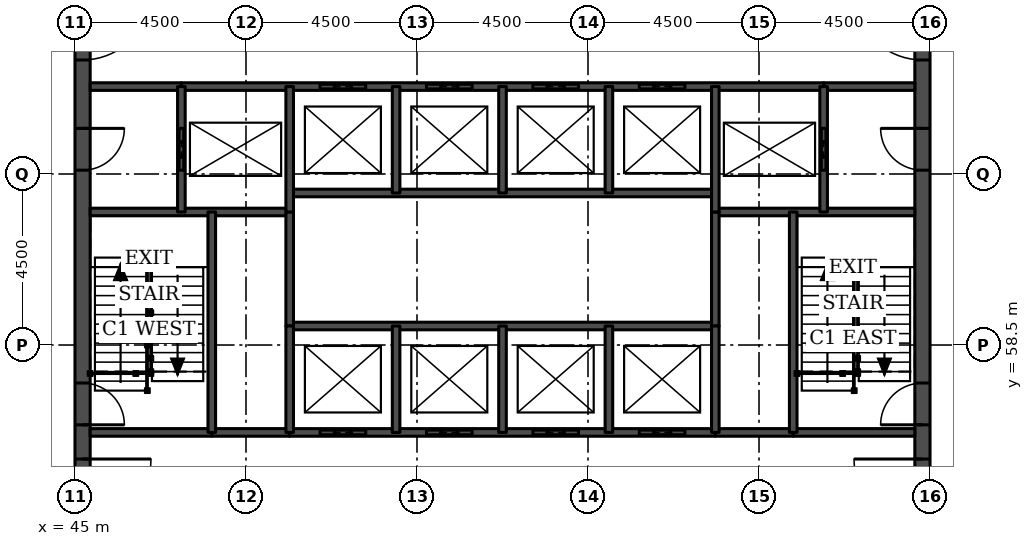
"""IFC4 building model, lengths in metres.
Left out: names, types, materials, properties, quantities, classifications, styles, units other than length and angle.
Written with IfcOpenShell. Run it as: python <this file> out.ifc"""

import sys

from ifc_helpers import new_model, si_unit, direction, frame, frame_2d, origin, place, context, subcontext, project, spatial, rectangle, extrude, element, fill, save


model = new_model("IFC4")
c1 = context("Model", 3, precision=1e-05, world=origin(), true_north=direction((0.0, 1.0)))
c2 = subcontext(c1, "Body", "Model", "MODEL_VIEW")
j1 = project(units=[si_unit("LENGTHUNIT", "METRE"), si_unit("PLANEANGLEUNIT", "RADIAN")], contexts=[c1])
p1 = place(None, origin())
s1 = spatial("IfcSite", under=j1, at=p1, CompositionType="ELEMENT")
p2 = place(p1, origin())
s2 = spatial("IfcBuilding", under=s1, at=p2, CompositionType="ELEMENT")
p3 = place(p2, frame((0.0, 0.0, 211.9)))
s3 = spatial("IfcBuildingStorey", under=s2, at=p3, CompositionType="ELEMENT", Elevation=211.9)
p4 = place(p3, frame((45.2, 49.5, 0.0), z_axis=(0.0, 0.0, 1.0), x_axis=(0.0, 1.0, 0.0)))
e1 = element("IfcWall", 1, at=p4, inside=s3, PredefinedType="SHEAR", context=c2, shape_type="SweptSolid", body=[
    extrude(rectangle(XDim=22.5, YDim=0.4, at=frame_2d((11.25, 0.0))), origin(), (0.0, 0.0, 1.0), 3.7),
])
p5 = place(p4, frame((4.2, 0.0, 0.0)))
e2 = element("IfcOpeningElement", 2, at=p5, cuts=e1, PredefinedType="OPENING", context=c2, shape_type="SweptSolid", body=[
    extrude(rectangle(XDim=1.8, YDim=2.1, at=frame_2d((0.9, 1.05))), frame((0.0, 0.21, 0.0), z_axis=(0.0, -1.0, 0.0), x_axis=(1.0, 0.0, 0.0)), (0.0, 0.0, 1.0), 0.42),
])
p6 = place(p4, frame((6.9, 0.0, 0.0)))
e3 = element("IfcOpeningElement", 3, at=p6, cuts=e1, PredefinedType="OPENING", context=c2, shape_type="SweptSolid", body=[
    extrude(rectangle(XDim=1.1, YDim=2.1, at=frame_2d((0.55, 1.05))), frame((0.0, 0.21, 0.0), z_axis=(0.0, -1.0, 0.0), x_axis=(1.0, 0.0, 0.0)), (0.0, 0.0, 1.0), 0.42),
])
p7 = place(p4, frame((13.6, 0.0, 0.0)))
e4 = element("IfcOpeningElement", 4, at=p7, cuts=e1, PredefinedType="OPENING", context=c2, shape_type="SweptSolid", body=[
    extrude(rectangle(XDim=1.1, YDim=2.1, at=frame_2d((0.55, 1.05))), frame((0.0, 0.21, 0.0), z_axis=(0.0, -1.0, 0.0), x_axis=(1.0, 0.0, 0.0)), (0.0, 0.0, 1.0), 0.42),
])
p8 = place(p4, frame((16.5, 0.0, 0.0)))
e5 = element("IfcOpeningElement", 5, at=p8, cuts=e1, PredefinedType="OPENING", context=c2, shape_type="SweptSolid", body=[
    extrude(rectangle(XDim=1.8, YDim=2.1, at=frame_2d((0.9, 1.05))), frame((0.0, 0.21, 0.0), z_axis=(0.0, -1.0, 0.0), x_axis=(1.0, 0.0, 0.0)), (0.0, 0.0, 1.0), 0.42),
])
p9 = place(p3, frame((67.3, 49.5, 0.0), z_axis=(0.0, 0.0, 1.0), x_axis=(0.0, 1.0, 0.0)))
e6 = element("IfcWall", 6, at=p9, inside=s3, PredefinedType="SHEAR", context=c2, shape_type="SweptSolid", body=[
    extrude(rectangle(XDim=22.5, YDim=0.4, at=frame_2d((11.25, 0.0))), origin(), (0.0, 0.0, 1.0), 3.7),
])
p10 = place(p9, frame((4.2, 0.0, 0.0)))
e7 = element("IfcOpeningElement", 7, at=p10, cuts=e6, PredefinedType="OPENING", context=c2, shape_type="SweptSolid", body=[
    extrude(rectangle(XDim=1.8, YDim=2.1, at=frame_2d((0.9, 1.05))), frame((0.0, 0.21, 0.0), z_axis=(0.0, -1.0, 0.0), x_axis=(1.0, 0.0, 0.0)), (0.0, 0.0, 1.0), 0.42),
])
p11 = place(p9, frame((6.9, 0.0, 0.0)))
e8 = element("IfcOpeningElement", 8, at=p11, cuts=e6, PredefinedType="OPENING", context=c2, shape_type="SweptSolid", body=[
    extrude(rectangle(XDim=1.1, YDim=2.1, at=frame_2d((0.55, 1.05))), frame((0.0, 0.21, 0.0), z_axis=(0.0, -1.0, 0.0), x_axis=(1.0, 0.0, 0.0)), (0.0, 0.0, 1.0), 0.42),
])
p12 = place(p9, frame((13.6, 0.0, 0.0)))
e9 = element("IfcOpeningElement", 9, at=p12, cuts=e6, PredefinedType="OPENING", context=c2, shape_type="SweptSolid", body=[
    extrude(rectangle(XDim=1.1, YDim=2.1, at=frame_2d((0.55, 1.05))), frame((0.0, 0.21, 0.0), z_axis=(0.0, -1.0, 0.0), x_axis=(1.0, 0.0, 0.0)), (0.0, 0.0, 1.0), 0.42),
])
p13 = place(p9, frame((16.5, 0.0, 0.0)))
e10 = element("IfcOpeningElement", 10, at=p13, cuts=e6, PredefinedType="OPENING", context=c2, shape_type="SweptSolid", body=[
    extrude(rectangle(XDim=1.8, YDim=2.1, at=frame_2d((0.9, 1.05))), frame((0.0, 0.21, 0.0), z_axis=(0.0, -1.0, 0.0), x_axis=(1.0, 0.0, 0.0)), (0.0, 0.0, 1.0), 0.42),
])
for number, where, z_axis, x_axis in (
    (11, (48.6, 56.2, 0.0), (0.0, 0.0, 1.0), (1.0, 0.0, 0.0)),
    (12, (61.85, 56.2, 0.0), (0.0, 0.0, 1.0), (1.0, 0.0, 0.0)),
):
    element("IfcWall", number, at=place(p3, frame(where, z_axis=z_axis, x_axis=x_axis)), inside=s3, PredefinedType="SOLIDWALL", context=c2, shape_type="SweptSolid", body=[
        extrude(rectangle(XDim=2.05, YDim=0.2, at=frame_2d((1.025, 0.0))), origin(), (0.0, 0.0, 1.0), 3.55),
    ])
p14 = place(p3, frame((45.4, 56.2, 0.0), z_axis=(0.0, 0.0, 1.0), x_axis=(1.0, 0.0, 0.0)))
e13 = element("IfcWall", 13, at=p14, inside=s3, PredefinedType="SOLIDWALL", context=c2, shape_type="SweptSolid", body=[
    extrude(rectangle(XDim=3.2, YDim=0.2, at=frame_2d((1.6, 0.0))), origin(), (0.0, 0.0, 1.0), 3.55),
])
p15 = place(p3, frame((50.65, 56.2, 0.0), z_axis=(0.0, 0.0, 1.0), x_axis=(1.0, 0.0, 0.0)))
e14 = element("IfcWall", 14, at=p15, inside=s3, PredefinedType="SOLIDWALL", context=c2, shape_type="SweptSolid", body=[
    extrude(rectangle(XDim=11.2, YDim=0.2, at=frame_2d((5.6, 0.0))), origin(), (0.0, 0.0, 1.0), 3.55),
])
p16 = place(p15, frame((0.8, 0.0, 0.0)))
e15 = element("IfcOpeningElement", 15, at=p16, cuts=e14, PredefinedType="OPENING", context=c2, shape_type="SweptSolid", body=[
    extrude(rectangle(XDim=1.2, YDim=2.1, at=frame_2d((0.6, 1.05))), frame((0.0, 0.11, 0.0), z_axis=(0.0, -1.0, 0.0), x_axis=(1.0, 0.0, 0.0)), (0.0, 0.0, 1.0), 0.22),
])
p17 = place(p15, frame((3.6, 0.0, 0.0)))
e16 = element("IfcOpeningElement", 16, at=p17, cuts=e14, PredefinedType="OPENING", context=c2, shape_type="SweptSolid", body=[
    extrude(rectangle(XDim=1.2, YDim=2.1, at=frame_2d((0.6, 1.05))), frame((0.0, 0.11, 0.0), z_axis=(0.0, -1.0, 0.0), x_axis=(1.0, 0.0, 0.0)), (0.0, 0.0, 1.0), 0.22),
])
p18 = place(p15, frame((6.4, 0.0, 0.0)))
e17 = element("IfcOpeningElement", 17, at=p18, cuts=e14, PredefinedType="OPENING", context=c2, shape_type="SweptSolid", body=[
    extrude(rectangle(XDim=1.2, YDim=2.1, at=frame_2d((0.6, 1.05))), frame((0.0, 0.11, 0.0), z_axis=(0.0, -1.0, 0.0), x_axis=(1.0, 0.0, 0.0)), (0.0, 0.0, 1.0), 0.22),
])
p19 = place(p15, frame((9.2, 0.0, 0.0)))
e18 = element("IfcOpeningElement", 18, at=p19, cuts=e14, PredefinedType="OPENING", context=c2, shape_type="SweptSolid", body=[
    extrude(rectangle(XDim=1.2, YDim=2.1, at=frame_2d((0.6, 1.05))), frame((0.0, 0.11, 0.0), z_axis=(0.0, -1.0, 0.0), x_axis=(1.0, 0.0, 0.0)), (0.0, 0.0, 1.0), 0.22),
])
p20 = place(p3, frame((63.9, 56.2, 0.0), z_axis=(0.0, 0.0, 1.0), x_axis=(1.0, 0.0, 0.0)))
e19 = element("IfcWall", 19, at=p20, inside=s3, PredefinedType="SOLIDWALL", context=c2, shape_type="SweptSolid", body=[
    extrude(rectangle(XDim=3.2, YDim=0.2, at=frame_2d((1.6, 0.0))), origin(), (0.0, 0.0, 1.0), 3.55),
])
p21 = place(p3, frame((50.65, 59.0, 0.0), z_axis=(0.0, 0.0, 1.0), x_axis=(1.0, 0.0, 0.0)))
e20 = element("IfcWall", 20, at=p21, inside=s3, PredefinedType="SOLIDWALL", context=c2, shape_type="SweptSolid", body=[
    extrude(rectangle(XDim=11.2, YDim=0.2, at=frame_2d((5.6, 0.0))), origin(), (0.0, 0.0, 1.0), 3.7),
])
for number, where, z_axis, x_axis in (
    (21, (45.4, 62.0, 0.0), (0.0, 0.0, 1.0), (1.0, 0.0, 0.0)),
    (22, (61.85, 62.0, 0.0), (0.0, 0.0, 1.0), (1.0, 0.0, 0.0)),
):
    element("IfcWall", number, at=place(p3, frame(where, z_axis=z_axis, x_axis=x_axis)), inside=s3, PredefinedType="SOLIDWALL", context=c2, shape_type="SweptSolid", body=[
        extrude(rectangle(XDim=5.25, YDim=0.2, at=frame_2d((2.625, 0.0))), origin(), (0.0, 0.0, 1.0), 3.55),
    ])
p22 = place(p3, frame((50.65, 62.5, 0.0), z_axis=(0.0, 0.0, 1.0), x_axis=(1.0, 0.0, 0.0)))
e23 = element("IfcWall", 23, at=p22, inside=s3, PredefinedType="SOLIDWALL", context=c2, shape_type="SweptSolid", body=[
    extrude(rectangle(XDim=11.2, YDim=0.2, at=frame_2d((5.6, 0.0))), origin(), (0.0, 0.0, 1.0), 3.7),
])
for number, where, z_axis, x_axis in (
    (24, (45.4, 65.3, 0.0), (0.0, 0.0, 1.0), (1.0, 0.0, 0.0)),
    (25, (64.7, 65.3, 0.0), (0.0, 0.0, 1.0), (1.0, 0.0, 0.0)),
):
    element("IfcWall", number, at=place(p3, frame(where, z_axis=z_axis, x_axis=x_axis)), inside=s3, PredefinedType="SOLIDWALL", context=c2, shape_type="SweptSolid", body=[
        extrude(rectangle(XDim=2.4, YDim=0.2, at=frame_2d((1.2, 0.0))), origin(), (0.0, 0.0, 1.0), 3.55),
    ])
p23 = place(p3, frame((47.8, 65.3, 0.0), z_axis=(0.0, 0.0, 1.0), x_axis=(1.0, 0.0, 0.0)))
e26 = element("IfcWall", 26, at=p23, inside=s3, PredefinedType="SOLIDWALL", context=c2, shape_type="SweptSolid", body=[
    extrude(rectangle(XDim=16.9, YDim=0.2, at=frame_2d((8.45, 0.0))), origin(), (0.0, 0.0, 1.0), 3.55),
])
p24 = place(p23, frame((3.65, 0.0, 0.0)))
e27 = element("IfcOpeningElement", 27, at=p24, cuts=e26, PredefinedType="OPENING", context=c2, shape_type="SweptSolid", body=[
    extrude(rectangle(XDim=1.2, YDim=2.1, at=frame_2d((0.6, 1.05))), frame((0.0, 0.11, 0.0), z_axis=(0.0, -1.0, 0.0), x_axis=(1.0, 0.0, 0.0)), (0.0, 0.0, 1.0), 0.22),
])
p25 = place(p23, frame((6.45, 0.0, 0.0)))
e28 = element("IfcOpeningElement", 28, at=p25, cuts=e26, PredefinedType="OPENING", context=c2, shape_type="SweptSolid", body=[
    extrude(rectangle(XDim=1.2, YDim=2.1, at=frame_2d((0.6, 1.05))), frame((0.0, 0.11, 0.0), z_axis=(0.0, -1.0, 0.0), x_axis=(1.0, 0.0, 0.0)), (0.0, 0.0, 1.0), 0.22),
])
p26 = place(p23, frame((9.25, 0.0, 0.0)))
e29 = element("IfcOpeningElement", 29, at=p26, cuts=e26, PredefinedType="OPENING", context=c2, shape_type="SweptSolid", body=[
    extrude(rectangle(XDim=1.2, YDim=2.1, at=frame_2d((0.6, 1.05))), frame((0.0, 0.11, 0.0), z_axis=(0.0, -1.0, 0.0), x_axis=(1.0, 0.0, 0.0)), (0.0, 0.0, 1.0), 0.22),
])
p27 = place(p23, frame((12.05, 0.0, 0.0)))
e30 = element("IfcOpeningElement", 30, at=p27, cuts=e26, PredefinedType="OPENING", context=c2, shape_type="SweptSolid", body=[
    extrude(rectangle(XDim=1.2, YDim=2.1, at=frame_2d((0.6, 1.05))), frame((0.0, 0.11, 0.0), z_axis=(0.0, -1.0, 0.0), x_axis=(1.0, 0.0, 0.0)), (0.0, 0.0, 1.0), 0.22),
])
p28 = place(p3, frame((47.8, 62.0, 0.0), z_axis=(0.0, 0.0, 1.0), x_axis=(0.0, 1.0, 0.0)))
e31 = element("IfcWall", 31, at=p28, inside=s3, PredefinedType="SOLIDWALL", context=c2, shape_type="SweptSolid", body=[
    extrude(rectangle(XDim=3.3, YDim=0.2, at=frame_2d((1.65, 0.0))), origin(), (0.0, 0.0, 1.0), 3.55),
])
p29 = place(p28, frame((1.1, 0.0, 0.0)))
e32 = element("IfcOpeningElement", 32, at=p29, cuts=e31, PredefinedType="OPENING", context=c2, shape_type="SweptSolid", body=[
    extrude(rectangle(XDim=1.1, YDim=2.1, at=frame_2d((0.55, 1.05))), frame((0.0, 0.11, 0.0), z_axis=(0.0, -1.0, 0.0), x_axis=(1.0, 0.0, 0.0)), (0.0, 0.0, 1.0), 0.22),
])
p30 = place(p3, frame((48.6, 56.2, 0.0), z_axis=(0.0, 0.0, 1.0), x_axis=(0.0, 1.0, 0.0)))
e33 = element("IfcWall", 33, at=p30, inside=s3, PredefinedType="SOLIDWALL", context=c2, shape_type="SweptSolid", body=[
    extrude(rectangle(XDim=5.8, YDim=0.2, at=frame_2d((2.9, 0.0))), origin(), (0.0, 0.0, 1.0), 3.55),
])
p31 = place(p3, frame((50.65, 59.0, 0.0), z_axis=(0.0, 0.0, 1.0), x_axis=(0.0, 1.0, 0.0)))
e34 = element("IfcWall", 34, at=p31, inside=s3, PredefinedType="SOLIDWALL", context=c2, shape_type="SweptSolid", body=[
    extrude(rectangle(XDim=3.0, YDim=0.2, at=frame_2d((1.5, 0.0))), origin(), (0.0, 0.0, 1.0), 3.7),
])
p32 = place(p3, frame((50.65, 56.2, 0.0), z_axis=(0.0, 0.0, 1.0), x_axis=(0.0, 1.0, 0.0)))
e35 = element("IfcWall", 35, at=p32, inside=s3, PredefinedType="SOLIDWALL", context=c2, shape_type="SweptSolid", body=[
    extrude(rectangle(XDim=2.8, YDim=0.2, at=frame_2d((1.4, 0.0))), origin(), (0.0, 0.0, 1.0), 3.55),
])
p33 = place(p3, frame((50.65, 62.0, 0.0), z_axis=(0.0, 0.0, 1.0), x_axis=(0.0, 1.0, 0.0)))
e36 = element("IfcWall", 36, at=p33, inside=s3, PredefinedType="SOLIDWALL", context=c2, shape_type="SweptSolid", body=[
    extrude(rectangle(XDim=3.3, YDim=0.2, at=frame_2d((1.65, 0.0))), origin(), (0.0, 0.0, 1.0), 3.55),
])
for number, where, z_axis, x_axis in (
    (37, (53.45, 56.2, 0.0), (0.0, 0.0, 1.0), (0.0, 1.0, 0.0)),
    (38, (53.45, 62.5, 0.0), (0.0, 0.0, 1.0), (0.0, 1.0, 0.0)),
    (39, (56.25, 56.2, 0.0), (0.0, 0.0, 1.0), (0.0, 1.0, 0.0)),
    (40, (56.25, 62.5, 0.0), (0.0, 0.0, 1.0), (0.0, 1.0, 0.0)),
    (41, (59.05, 56.2, 0.0), (0.0, 0.0, 1.0), (0.0, 1.0, 0.0)),
    (42, (59.05, 62.5, 0.0), (0.0, 0.0, 1.0), (0.0, 1.0, 0.0)),
):
    element("IfcWall", number, at=place(p3, frame(where, z_axis=z_axis, x_axis=x_axis)), inside=s3, PredefinedType="SOLIDWALL", context=c2, shape_type="SweptSolid", body=[
        extrude(rectangle(XDim=2.8, YDim=0.2, at=frame_2d((1.4, 0.0))), origin(), (0.0, 0.0, 1.0), 3.55),
    ])
p34 = place(p3, frame((61.85, 59.0, 0.0), z_axis=(0.0, 0.0, 1.0), x_axis=(0.0, 1.0, 0.0)))
e43 = element("IfcWall", 43, at=p34, inside=s3, PredefinedType="SOLIDWALL", context=c2, shape_type="SweptSolid", body=[
    extrude(rectangle(XDim=3.0, YDim=0.2, at=frame_2d((1.5, 0.0))), origin(), (0.0, 0.0, 1.0), 3.7),
])
p35 = place(p3, frame((61.85, 56.2, 0.0), z_axis=(0.0, 0.0, 1.0), x_axis=(0.0, 1.0, 0.0)))
e44 = element("IfcWall", 44, at=p35, inside=s3, PredefinedType="SOLIDWALL", context=c2, shape_type="SweptSolid", body=[
    extrude(rectangle(XDim=2.8, YDim=0.2, at=frame_2d((1.4, 0.0))), origin(), (0.0, 0.0, 1.0), 3.55),
])
p36 = place(p3, frame((61.85, 62.0, 0.0), z_axis=(0.0, 0.0, 1.0), x_axis=(0.0, 1.0, 0.0)))
e45 = element("IfcWall", 45, at=p36, inside=s3, PredefinedType="SOLIDWALL", context=c2, shape_type="SweptSolid", body=[
    extrude(rectangle(XDim=3.3, YDim=0.2, at=frame_2d((1.65, 0.0))), origin(), (0.0, 0.0, 1.0), 3.55),
])
p37 = place(p3, frame((63.9, 56.2, 0.0), z_axis=(0.0, 0.0, 1.0), x_axis=(0.0, 1.0, 0.0)))
e46 = element("IfcWall", 46, at=p37, inside=s3, PredefinedType="SOLIDWALL", context=c2, shape_type="SweptSolid", body=[
    extrude(rectangle(XDim=5.8, YDim=0.2, at=frame_2d((2.9, 0.0))), origin(), (0.0, 0.0, 1.0), 3.55),
])
p38 = place(p3, frame((64.7, 62.0, 0.0), z_axis=(0.0, 0.0, 1.0), x_axis=(0.0, 1.0, 0.0)))
e47 = element("IfcWall", 47, at=p38, inside=s3, PredefinedType="SOLIDWALL", context=c2, shape_type="SweptSolid", body=[
    extrude(rectangle(XDim=3.3, YDim=0.2, at=frame_2d((1.65, 0.0))), origin(), (0.0, 0.0, 1.0), 3.55),
])
p39 = place(p38, frame((1.1, 0.0, 0.0)))
e48 = element("IfcOpeningElement", 48, at=p39, cuts=e47, PredefinedType="OPENING", context=c2, shape_type="SweptSolid", body=[
    extrude(rectangle(XDim=1.1, YDim=2.1, at=frame_2d((0.55, 1.05))), frame((0.0, 0.11, 0.0), z_axis=(0.0, -1.0, 0.0), x_axis=(1.0, 0.0, 0.0)), (0.0, 0.0, 1.0), 0.22),
])
p40 = place(p16, origin())
e49 = element("IfcDoor", 49, at=p40, inside=s3, OperationType="DOUBLE_DOOR_SLIDING", PredefinedType="DOOR", context=c2, shape_type="SweptSolid", body=[
    extrude(rectangle(XDim=1.2, YDim=2.1, at=frame_2d((0.6, 1.05))), frame((0.0, 0.025, 0.0), z_axis=(0.0, -1.0, 0.0), x_axis=(1.0, 0.0, 0.0)), (0.0, 0.0, 1.0), 0.05),
])
fill(e15, e49)
p41 = place(p17, origin())
e50 = element("IfcDoor", 50, at=p41, inside=s3, OperationType="DOUBLE_DOOR_SLIDING", PredefinedType="DOOR", context=c2, shape_type="SweptSolid", body=[
    extrude(rectangle(XDim=1.2, YDim=2.1, at=frame_2d((0.6, 1.05))), frame((0.0, 0.025, 0.0), z_axis=(0.0, -1.0, 0.0), x_axis=(1.0, 0.0, 0.0)), (0.0, 0.0, 1.0), 0.05),
])
fill(e16, e50)
p42 = place(p18, origin())
e51 = element("IfcDoor", 51, at=p42, inside=s3, OperationType="DOUBLE_DOOR_SLIDING", PredefinedType="DOOR", context=c2, shape_type="SweptSolid", body=[
    extrude(rectangle(XDim=1.2, YDim=2.1, at=frame_2d((0.6, 1.05))), frame((0.0, 0.025, 0.0), z_axis=(0.0, -1.0, 0.0), x_axis=(1.0, 0.0, 0.0)), (0.0, 0.0, 1.0), 0.05),
])
fill(e17, e51)
p43 = place(p19, origin())
e52 = element("IfcDoor", 52, at=p43, inside=s3, OperationType="DOUBLE_DOOR_SLIDING", PredefinedType="DOOR", context=c2, shape_type="SweptSolid", body=[
    extrude(rectangle(XDim=1.2, YDim=2.1, at=frame_2d((0.6, 1.05))), frame((0.0, 0.025, 0.0), z_axis=(0.0, -1.0, 0.0), x_axis=(1.0, 0.0, 0.0)), (0.0, 0.0, 1.0), 0.05),
])
fill(e18, e52)
p44 = place(p24, origin())
e53 = element("IfcDoor", 53, at=p44, inside=s3, OperationType="DOUBLE_DOOR_SLIDING", PredefinedType="DOOR", context=c2, shape_type="SweptSolid", body=[
    extrude(rectangle(XDim=1.2, YDim=2.1, at=frame_2d((0.6, 1.05))), frame((0.0, 0.025, 0.0), z_axis=(0.0, -1.0, 0.0), x_axis=(1.0, 0.0, 0.0)), (0.0, 0.0, 1.0), 0.05),
])
fill(e27, e53)
p45 = place(p25, origin())
e54 = element("IfcDoor", 54, at=p45, inside=s3, OperationType="DOUBLE_DOOR_SLIDING", PredefinedType="DOOR", context=c2, shape_type="SweptSolid", body=[
    extrude(rectangle(XDim=1.2, YDim=2.1, at=frame_2d((0.6, 1.05))), frame((0.0, 0.025, 0.0), z_axis=(0.0, -1.0, 0.0), x_axis=(1.0, 0.0, 0.0)), (0.0, 0.0, 1.0), 0.05),
])
fill(e28, e54)
p46 = place(p26, origin())
e55 = element("IfcDoor", 55, at=p46, inside=s3, OperationType="DOUBLE_DOOR_SLIDING", PredefinedType="DOOR", context=c2, shape_type="SweptSolid", body=[
    extrude(rectangle(XDim=1.2, YDim=2.1, at=frame_2d((0.6, 1.05))), frame((0.0, 0.025, 0.0), z_axis=(0.0, -1.0, 0.0), x_axis=(1.0, 0.0, 0.0)), (0.0, 0.0, 1.0), 0.05),
])
fill(e29, e55)
p47 = place(p27, origin())
e56 = element("IfcDoor", 56, at=p47, inside=s3, OperationType="DOUBLE_DOOR_SLIDING", PredefinedType="DOOR", context=c2, shape_type="SweptSolid", body=[
    extrude(rectangle(XDim=1.2, YDim=2.1, at=frame_2d((0.6, 1.05))), frame((0.0, 0.025, 0.0), z_axis=(0.0, -1.0, 0.0), x_axis=(1.0, 0.0, 0.0)), (0.0, 0.0, 1.0), 0.05),
])
fill(e30, e56)
p48 = place(p29, origin())
e57 = element("IfcDoor", 57, at=p48, inside=s3, OperationType="DOUBLE_DOOR_SLIDING", PredefinedType="DOOR", context=c2, shape_type="SweptSolid", body=[
    extrude(rectangle(XDim=1.1, YDim=2.1, at=frame_2d((0.55, 1.05))), frame((0.0, 0.025, 0.0), z_axis=(0.0, -1.0, 0.0), x_axis=(1.0, 0.0, 0.0)), (0.0, 0.0, 1.0), 0.05),
])
fill(e32, e57)
p49 = place(p39, origin())
e58 = element("IfcDoor", 58, at=p49, inside=s3, OperationType="DOUBLE_DOOR_SLIDING", PredefinedType="DOOR", context=c2, shape_type="SweptSolid", body=[
    extrude(rectangle(XDim=1.1, YDim=2.1, at=frame_2d((0.55, 1.05))), frame((0.0, 0.025, 0.0), z_axis=(0.0, -1.0, 0.0), x_axis=(1.0, 0.0, 0.0)), (0.0, 0.0, 1.0), 0.05),
])
fill(e48, e58)
p50 = place(p5, frame((1.8, 0.0, 0.0), z_axis=(0.0, 0.0, 1.0), x_axis=(-1.0, 0.0, 0.0)))
e59 = element("IfcDoor", 59, at=p50, inside=s3, OperationType="SINGLE_SWING_LEFT", PredefinedType="DOOR", context=c2, shape_type="SweptSolid", body=[
    extrude(rectangle(XDim=1.8, YDim=2.1, at=frame_2d((0.9, 1.05))), frame((0.0, 0.025, 0.0), z_axis=(0.0, -1.0, 0.0), x_axis=(1.0, 0.0, 0.0)), (0.0, 0.0, 1.0), 0.05),
])
fill(e2, e59)
p51 = place(p6, frame((1.1, 0.0, 0.0), z_axis=(0.0, 0.0, 1.0), x_axis=(-1.0, 0.0, 0.0)))
e60 = element("IfcDoor", 60, at=p51, inside=s3, OperationType="SINGLE_SWING_RIGHT", PredefinedType="DOOR", context=c2, shape_type="SweptSolid", body=[
    extrude(rectangle(XDim=1.1, YDim=2.1, at=frame_2d((0.55, 1.05))), frame((0.0, 0.025, 0.0), z_axis=(0.0, -1.0, 0.0), x_axis=(1.0, 0.0, 0.0)), (0.0, 0.0, 1.0), 0.05),
])
fill(e3, e60)
p52 = place(p7, frame((1.1, 0.0, 0.0), z_axis=(0.0, 0.0, 1.0), x_axis=(-1.0, 0.0, 0.0)))
e61 = element("IfcDoor", 61, at=p52, inside=s3, OperationType="SINGLE_SWING_LEFT", PredefinedType="DOOR", context=c2, shape_type="SweptSolid", body=[
    extrude(rectangle(XDim=1.1, YDim=2.1, at=frame_2d((0.55, 1.05))), frame((0.0, 0.025, 0.0), z_axis=(0.0, -1.0, 0.0), x_axis=(1.0, 0.0, 0.0)), (0.0, 0.0, 1.0), 0.05),
])
fill(e4, e61)
p53 = place(p8, frame((1.8, 0.0, 0.0), z_axis=(0.0, 0.0, 1.0), x_axis=(-1.0, 0.0, 0.0)))
e62 = element("IfcDoor", 62, at=p53, inside=s3, OperationType="SINGLE_SWING_LEFT", PredefinedType="DOOR", context=c2, shape_type="SweptSolid", body=[
    extrude(rectangle(XDim=1.8, YDim=2.1, at=frame_2d((0.9, 1.05))), frame((0.0, 0.025, 0.0), z_axis=(0.0, -1.0, 0.0), x_axis=(1.0, 0.0, 0.0)), (0.0, 0.0, 1.0), 0.05),
])
fill(e5, e62)
p54 = place(p10, origin())
e63 = element("IfcDoor", 63, at=p54, inside=s3, OperationType="SINGLE_SWING_RIGHT", PredefinedType="DOOR", context=c2, shape_type="SweptSolid", body=[
    extrude(rectangle(XDim=1.8, YDim=2.1, at=frame_2d((0.9, 1.05))), frame((0.0, 0.025, 0.0), z_axis=(0.0, -1.0, 0.0), x_axis=(1.0, 0.0, 0.0)), (0.0, 0.0, 1.0), 0.05),
])
fill(e7, e63)
p55 = place(p11, origin())
e64 = element("IfcDoor", 64, at=p55, inside=s3, OperationType="SINGLE_SWING_LEFT", PredefinedType="DOOR", context=c2, shape_type="SweptSolid", body=[
    extrude(rectangle(XDim=1.1, YDim=2.1, at=frame_2d((0.55, 1.05))), frame((0.0, 0.025, 0.0), z_axis=(0.0, -1.0, 0.0), x_axis=(1.0, 0.0, 0.0)), (0.0, 0.0, 1.0), 0.05),
])
fill(e8, e64)
p56 = place(p12, origin())
e65 = element("IfcDoor", 65, at=p56, inside=s3, OperationType="SINGLE_SWING_RIGHT", PredefinedType="DOOR", context=c2, shape_type="SweptSolid", body=[
    extrude(rectangle(XDim=1.1, YDim=2.1, at=frame_2d((0.55, 1.05))), frame((0.0, 0.025, 0.0), z_axis=(0.0, -1.0, 0.0), x_axis=(1.0, 0.0, 0.0)), (0.0, 0.0, 1.0), 0.05),
])
fill(e9, e65)
p57 = place(p13, origin())
e66 = element("IfcDoor", 66, at=p57, inside=s3, OperationType="SINGLE_SWING_RIGHT", PredefinedType="DOOR", context=c2, shape_type="SweptSolid", body=[
    extrude(rectangle(XDim=1.8, YDim=2.1, at=frame_2d((0.9, 1.05))), frame((0.0, 0.025, 0.0), z_axis=(0.0, -1.0, 0.0), x_axis=(1.0, 0.0, 0.0)), (0.0, 0.0, 1.0), 0.05),
])
fill(e10, e66)
save(model, sys.argv[1])
